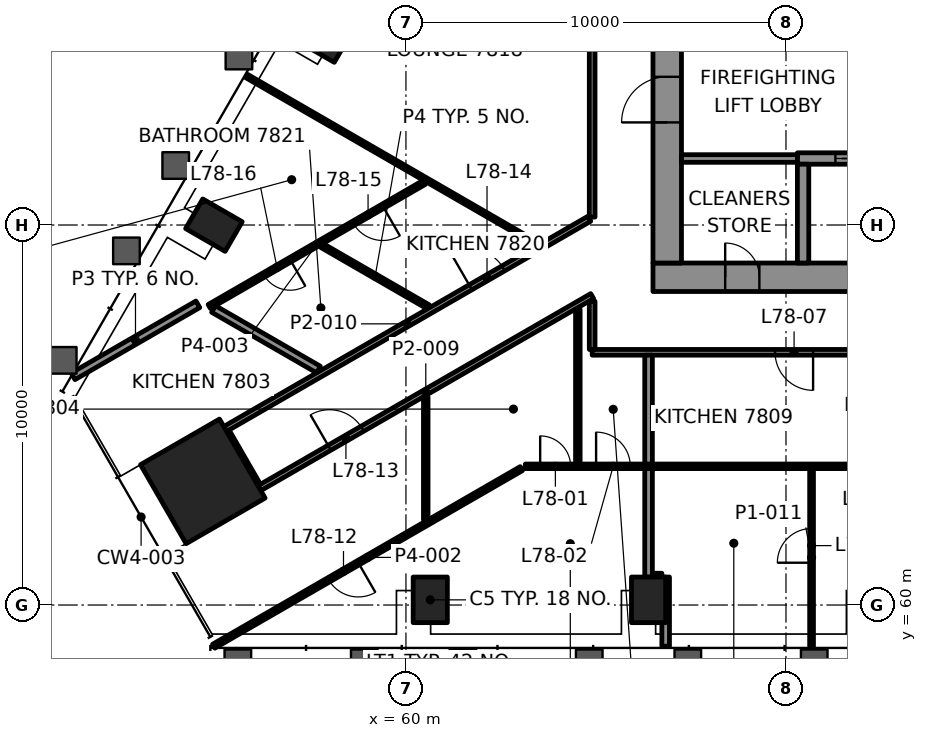
"""IFC4 building model, lengths in metres.
Left out: names, types, materials, properties, quantities, classifications, styles, units other than length and angle.
Written with IfcOpenShell. Run it as: python <this file> out.ifc"""

import sys

from ifc_helpers import new_model, si_unit, direction, frame, frame_2d, origin, origin_2d, place, context, subcontext, project, spatial, rectangle, hollow_rectangle, extrude, element, fill, save


model = new_model("IFC4")
c1 = context("Model", 3, precision=1e-05, world=origin(), true_north=direction((0.0, 1.0)))
c2 = subcontext(c1, "Body", "Model", "MODEL_VIEW")
j1 = project(units=[si_unit("LENGTHUNIT", "METRE"), si_unit("PLANEANGLEUNIT", "RADIAN")], contexts=[c1])
p1 = place(None, origin())
s1 = spatial("IfcSite", under=j1, at=p1, CompositionType="ELEMENT")
p2 = place(p1, origin())
s2 = spatial("IfcBuilding", under=s1, at=p2, CompositionType="ELEMENT")
p3 = place(p2, frame((0.0, 0.0, 319.6)))
s3 = spatial("IfcBuildingStorey", under=s2, at=p3, CompositionType="ELEMENT", Elevation=319.6)
p4 = place(p3, frame((54.655, 63.254, 0.0), z_axis=(0.0, 0.0, 1.0), x_axis=(0.5, -0.866025403784, 0.0)))
e1 = element("IfcColumn", 1, at=p4, inside=s3, PredefinedType="COLUMN", context=c2, shape_type="SweptSolid", body=[
    extrude(rectangle(XDim=2.4, YDim=2.4, at=origin_2d()), origin(), (0.0, 0.0, 1.0), 3.5),
])
for number, where, z_axis, x_axis in (
    (2, (60.64, 60.136, -0.0), (0.0, 0.0, 1.0), (1.0, 0.0, 0.0)),
    (3, (66.384, 60.136, -0.0), (0.0, 0.0, 1.0), (1.0, 0.0, 0.0)),
    (4, (57.819, 74.97, -0.0), (0.0, 0.0, 1.0), (-0.5, -0.866, 0.0)),
    (5, (54.948, 69.996, -0.0), (0.0, 0.0, 1.0), (-0.5, -0.866, 0.0)),
):
    element("IfcColumn", number, at=place(p3, frame(where, z_axis=z_axis, x_axis=x_axis)), inside=s3, PredefinedType="COLUMN", context=c2, shape_type="SweptSolid", body=[
        extrude(hollow_rectangle(XDim=0.9, YDim=1.2, WallThickness=0.06, at=origin_2d()), origin(), (0.0, 0.0, 1.0), 3.5),
    ])
p5 = place(p3, frame((66.5, 68.625, 0.0), z_axis=(0.0, 0.0, 1.0), x_axis=(1.0, 0.0, 0.0)))
e6 = element("IfcWall", 6, at=p5, inside=s3, PredefinedType="SHEAR", context=c2, shape_type="SweptSolid", body=[
    extrude(rectangle(XDim=17.0, YDim=0.75, at=frame_2d((8.5, 0.0))), origin(), (0.0, 0.0, 1.0), 3.3),
])
p6 = place(p5, frame((1.9, 0.0, 0.0)))
e7 = element("IfcOpeningElement", 7, at=p6, cuts=e6, PredefinedType="OPENING", context=c2, shape_type="SweptSolid", body=[
    extrude(rectangle(XDim=0.9, YDim=2.1, at=frame_2d((0.45, 1.05))), frame((0.0, 0.385, 0.0), z_axis=(0.0, -1.0, 0.0), x_axis=(1.0, 0.0, 0.0)), (0.0, 0.0, 1.0), 0.77),
])
p7 = place(p3, frame((66.875, 69.0, 0.0), z_axis=(0.0, 0.0, 1.0), x_axis=(0.0, 1.0, 0.0)))
e8 = element("IfcWall", 8, at=p7, inside=s3, PredefinedType="SHEAR", context=c2, shape_type="SweptSolid", body=[
    extrude(rectangle(XDim=12.0, YDim=0.75, at=frame_2d((6.0, 0.0))), origin(), (0.0, 0.0, 1.0), 3.3),
])
p8 = place(p7, frame((3.7, 0.0, 0.0)))
e9 = element("IfcOpeningElement", 9, at=p8, cuts=e8, PredefinedType="OPENING", context=c2, shape_type="SweptSolid", body=[
    extrude(rectangle(XDim=1.2, YDim=2.1, at=frame_2d((0.6, 1.05))), frame((0.0, 0.385, 0.0), z_axis=(0.0, -1.0, 0.0), x_axis=(1.0, 0.0, 0.0)), (0.0, 0.0, 1.0), 0.77),
])
p9 = place(p3, frame((70.3, 71.75, 0.0), z_axis=(0.0, 0.0, 1.0), x_axis=(1.0, 0.0, 0.0)))
e10 = element("IfcWall", 10, at=p9, inside=s3, PredefinedType="SHEAR", context=c2, shape_type="SweptSolid", body=[
    extrude(rectangle(XDim=11.5, YDim=0.3, at=frame_2d((5.75, 0.0))), origin(), (0.0, 0.0, 1.0), 3.3),
])
p10 = place(p9, frame((1.0, 0.0, 0.0)))
e11 = element("IfcOpeningElement", 11, at=p10, cuts=e10, PredefinedType="OPENING", context=c2, shape_type="SweptSolid", body=[
    extrude(rectangle(XDim=1.1, YDim=2.1, at=frame_2d((0.55, 1.05))), frame((0.0, 0.16, 0.0), z_axis=(0.0, -1.0, 0.0), x_axis=(1.0, 0.0, 0.0)), (0.0, 0.0, 1.0), 0.32),
])
p11 = place(p9, frame((3.8, 0.0, 0.0)))
e12 = element("IfcOpeningElement", 12, at=p11, cuts=e10, PredefinedType="OPENING", context=c2, shape_type="SweptSolid", body=[
    extrude(rectangle(XDim=1.1, YDim=2.1, at=frame_2d((0.55, 1.05))), frame((0.0, 0.16, 0.0), z_axis=(0.0, -1.0, 0.0), x_axis=(1.0, 0.0, 0.0)), (0.0, 0.0, 1.0), 0.32),
])
p12 = place(p9, frame((6.6, 0.0, 0.0)))
e13 = element("IfcOpeningElement", 13, at=p12, cuts=e10, PredefinedType="OPENING", context=c2, shape_type="SweptSolid", body=[
    extrude(rectangle(XDim=1.1, YDim=2.1, at=frame_2d((0.55, 1.05))), frame((0.0, 0.16, 0.0), z_axis=(0.0, -1.0, 0.0), x_axis=(1.0, 0.0, 0.0)), (0.0, 0.0, 1.0), 0.32),
])
p13 = place(p9, frame((9.4, 0.0, 0.0)))
e14 = element("IfcOpeningElement", 14, at=p13, cuts=e10, PredefinedType="OPENING", context=c2, shape_type="SweptSolid", body=[
    extrude(rectangle(XDim=1.1, YDim=2.1, at=frame_2d((0.55, 1.05))), frame((0.0, 0.16, 0.0), z_axis=(0.0, -1.0, 0.0), x_axis=(1.0, 0.0, 0.0)), (0.0, 0.0, 1.0), 0.32),
])
p14 = place(p3, frame((70.45, 69.0, 0.0), z_axis=(0.0, 0.0, 1.0), x_axis=(0.0, 1.0, 0.0)))
e15 = element("IfcWall", 15, at=p14, inside=s3, PredefinedType="SHEAR", context=c2, shape_type="SweptSolid", body=[
    extrude(rectangle(XDim=2.6, YDim=0.3, at=frame_2d((1.3, 0.0))), origin(), (0.0, 0.0, 1.0), 3.3),
])
p15 = place(p3, frame((66.484, 60.736, 0.0), z_axis=(0.0, 0.0, 1.0), x_axis=(1.0, 0.0, 0.0)))
e16 = element("IfcWall", 16, at=p15, inside=s3, PredefinedType="PARTITIONING", context=c2, shape_type="SweptSolid", body=[
    extrude(rectangle(XDim=0.25, YDim=0.2, at=frame_2d((0.125, 0.0))), origin(), (0.0, 0.0, 1.0), 2.7),
])
p16 = place(p3, frame((63.141, 63.65, 0.0), z_axis=(0.0, 0.0, 1.0), x_axis=(1.0, 0.0, 0.0)))
e17 = element("IfcWall", 17, at=p16, inside=s3, PredefinedType="PARTITIONING", context=c2, shape_type="SweptSolid", body=[
    extrude(rectangle(XDim=18.56, YDim=0.12, at=frame_2d((9.28, 0.0))), origin(), (0.0, 0.0, 1.0), 2.7),
])
p17 = place(p16, frame((0.391, 0.0, 0.0)))
e18 = element("IfcOpeningElement", 18, at=p17, cuts=e17, PredefinedType="OPENING", context=c2, shape_type="SweptSolid", body=[
    extrude(rectangle(XDim=0.8, YDim=2.1, at=frame_2d((0.4, 1.05))), frame((0.0, 0.07, 0.0), z_axis=(0.0, -1.0, 0.0), x_axis=(1.0, 0.0, 0.0)), (0.0, 0.0, 1.0), 0.14),
])
p18 = place(p16, frame((1.862, 0.0, 0.0)))
e19 = element("IfcOpeningElement", 19, at=p18, cuts=e17, PredefinedType="OPENING", context=c2, shape_type="SweptSolid", body=[
    extrude(rectangle(XDim=0.9, YDim=2.1, at=frame_2d((0.45, 1.05))), frame((0.0, 0.07, 0.0), z_axis=(0.0, -1.0, 0.0), x_axis=(1.0, 0.0, 0.0)), (0.0, 0.0, 1.0), 0.14),
])
p19 = place(p16, frame((8.768, 0.0, 0.0)))
e20 = element("IfcOpeningElement", 20, at=p19, cuts=e17, PredefinedType="OPENING", context=c2, shape_type="SweptSolid", body=[
    extrude(rectangle(XDim=0.9, YDim=2.1, at=frame_2d((0.45, 1.05))), frame((0.0, 0.07, 0.0), z_axis=(0.0, -1.0, 0.0), x_axis=(1.0, 0.0, 0.0)), (0.0, 0.0, 1.0), 0.14),
])
p20 = place(p16, frame((12.188, 0.0, 0.0)))
e21 = element("IfcOpeningElement", 21, at=p20, cuts=e17, PredefinedType="OPENING", context=c2, shape_type="SweptSolid", body=[
    extrude(rectangle(XDim=0.8, YDim=2.1, at=frame_2d((0.4, 1.05))), frame((0.0, 0.07, 0.0), z_axis=(0.0, -1.0, 0.0), x_axis=(1.0, 0.0, 0.0)), (0.0, 0.0, 1.0), 0.14),
])
p21 = place(p16, frame((16.514, 0.0, 0.0)))
e22 = element("IfcOpeningElement", 22, at=p21, cuts=e17, PredefinedType="OPENING", context=c2, shape_type="SweptSolid", body=[
    extrude(rectangle(XDim=0.9, YDim=2.1, at=frame_2d((0.45, 1.05))), frame((0.0, 0.07, 0.0), z_axis=(0.0, -1.0, 0.0), x_axis=(1.0, 0.0, 0.0)), (0.0, 0.0, 1.0), 0.14),
])
p22 = place(p3, frame((85.099, 66.65, 0.0), z_axis=(0.0, 0.0, 1.0), x_axis=(-1.0, 0.0, 0.0)))
e23 = element("IfcWall", 23, at=p22, inside=s3, PredefinedType="PARTITIONING", context=c2, shape_type="SweptSolid", body=[
    extrude(rectangle(XDim=20.199, YDim=0.15, at=frame_2d((10.1, 0.0))), origin(), (0.0, 0.0, 1.0), 2.7),
])
p23 = place(p22, frame((1.351, 0.0, 0.0)))
e24 = element("IfcOpeningElement", 24, at=p23, cuts=e23, PredefinedType="OPENING", context=c2, shape_type="SweptSolid", body=[
    extrude(rectangle(XDim=0.9, YDim=2.1, at=frame_2d((0.45, 1.05))), frame((0.0, 0.085, 0.0), z_axis=(0.0, -1.0, 0.0), x_axis=(1.0, 0.0, 0.0)), (0.0, 0.0, 1.0), 0.17),
])
p24 = place(p22, frame((14.386, 0.0, 0.0)))
e25 = element("IfcOpeningElement", 25, at=p24, cuts=e23, PredefinedType="OPENING", context=c2, shape_type="SweptSolid", body=[
    extrude(rectangle(XDim=1.0, YDim=2.1, at=frame_2d((0.5, 1.05))), frame((0.0, 0.085, 0.0), z_axis=(0.0, -1.0, 0.0), x_axis=(1.0, 0.0, 0.0)), (0.0, 0.0, 1.0), 0.17),
])
p25 = place(p3, frame((63.037, 63.59, 0.0), z_axis=(0.0, 0.0, 1.0), x_axis=(-0.866024667879, -0.500001274624, 0.0)))
e26 = element("IfcWall", 26, at=p25, inside=s3, PredefinedType="PARTITIONING", context=c2, shape_type="SweptSolid", body=[
    extrude(rectangle(XDim=9.348, YDim=0.12, at=frame_2d((4.674, 0.0))), origin(), (0.0, 0.0, 1.0), 2.7),
])
p26 = place(p25, frame((4.955, 0.0, 0.0)))
e27 = element("IfcOpeningElement", 27, at=p26, cuts=e26, PredefinedType="OPENING", context=c2, shape_type="SweptSolid", body=[
    extrude(rectangle(XDim=0.9, YDim=2.1, at=frame_2d((0.45, 1.05))), frame((0.0, 0.07, 0.0), z_axis=(0.0, -1.0, 0.0), x_axis=(1.0, 0.0, 0.0)), (0.0, 0.0, 1.0), 0.14),
])
p27 = place(p3, frame((56.145, 63.075, 0.0), z_axis=(0.0, 0.0, 1.0), x_axis=(0.866024727794, 0.500001170848, 0.0)))
e28 = element("IfcWall", 28, at=p27, inside=s3, PredefinedType="PARTITIONING", context=c2, shape_type="SweptSolid", body=[
    extrude(rectangle(XDim=10.11, YDim=0.15, at=frame_2d((5.055, 0.0))), origin(), (0.0, 0.0, 1.0), 2.697),
])
p28 = place(p27, frame((2.128, 0.0, 0.0)))
e29 = element("IfcOpeningElement", 29, at=p28, cuts=e28, PredefinedType="OPENING", context=c2, shape_type="SweptSolid", body=[
    extrude(rectangle(XDim=1.0, YDim=2.1, at=frame_2d((0.5, 1.05))), frame((0.0, 0.085, 0.0), z_axis=(0.0, -1.0, 0.0), x_axis=(1.0, 0.0, 0.0)), (0.0, 0.0, 1.0), 0.17),
])
p29 = place(p3, frame((55.244, 64.634, 0.0), z_axis=(0.0, 0.0, 1.0), x_axis=(0.866029028053, 0.499993722531, 0.0)))
e30 = element("IfcWall", 30, at=p29, inside=s3, PredefinedType="PARTITIONING", context=c2, shape_type="SweptSolid", body=[
    extrude(rectangle(XDim=11.063, YDim=0.15, at=frame_2d((5.531, 0.0))), origin(), (0.0, 0.0, 1.0), 2.7),
])
p30 = place(p29, frame((7.454, 0.0, 0.0)))
e31 = element("IfcOpeningElement", 31, at=p30, cuts=e30, PredefinedType="OPENING", context=c2, shape_type="SweptSolid", body=[
    extrude(rectangle(XDim=1.0, YDim=2.1, at=frame_2d((0.5, 1.05))), frame((0.0, 0.085, 0.0), z_axis=(0.0, -1.0, 0.0), x_axis=(1.0, 0.0, 0.0)), (0.0, 0.0, 1.0), 0.17),
])
p31 = place(p3, frame((60.485, 71.123, 0.0), z_axis=(0.0, 0.0, 1.0), x_axis=(-0.866018230694, -0.500012423951, 0.0)))
e32 = element("IfcWall", 32, at=p31, inside=s3, PredefinedType="PARTITIONING", context=c2, shape_type="SweptSolid", body=[
    extrude(rectangle(XDim=6.535, YDim=0.12, at=frame_2d((3.268, 0.0))), origin(), (0.0, 0.0, 1.0), 2.7),
])
p32 = place(p31, frame((1.261, 0.0, 0.0)))
e33 = element("IfcOpeningElement", 33, at=p32, cuts=e32, PredefinedType="OPENING", context=c2, shape_type="SweptSolid", body=[
    extrude(rectangle(XDim=0.9, YDim=2.1, at=frame_2d((0.45, 1.05))), frame((0.0, 0.07, 0.0), z_axis=(0.0, -1.0, 0.0), x_axis=(1.0, 0.0, 0.0)), (0.0, 0.0, 1.0), 0.14),
])
p33 = place(p31, frame((4.077, 0.0, 0.0)))
e34 = element("IfcOpeningElement", 34, at=p33, cuts=e32, PredefinedType="OPENING", context=c2, shape_type="SweptSolid", body=[
    extrude(rectangle(XDim=0.8, YDim=2.1, at=frame_2d((0.4, 1.05))), frame((0.0, 0.07, 0.0), z_axis=(0.0, -1.0, 0.0), x_axis=(1.0, 0.0, 0.0)), (0.0, 0.0, 1.0), 0.14),
])
p34 = place(p3, frame((51.242, 66.018, 0.0), z_axis=(0.0, 0.0, 1.0), x_axis=(0.866010743078, 0.500025392229, 0.0)))
e35 = element("IfcWall", 35, at=p34, inside=s3, PredefinedType="PARTITIONING", context=c2, shape_type="SweptSolid", body=[
    extrude(rectangle(XDim=3.79, YDim=0.2, at=frame_2d((1.895, 0.0))), origin(), (0.0, 0.0, 1.0), 2.7),
])
p35 = place(p3, frame((70.673, 58.916, 0.0), z_axis=(0.0, 0.0, 1.0), x_axis=(0.0, 1.0, 0.0)))
e36 = element("IfcWall", 36, at=p35, inside=s3, PredefinedType="PARTITIONING", context=c2, shape_type="SweptSolid", body=[
    extrude(rectangle(XDim=4.674, YDim=0.1, at=frame_2d((2.337, 0.0))), origin(), (0.0, 0.0, 1.0), 2.688),
])
p36 = place(p35, frame((2.197, 0.0, 0.0)))
e37 = element("IfcOpeningElement", 37, at=p36, cuts=e36, PredefinedType="OPENING", context=c2, shape_type="SweptSolid", body=[
    extrude(rectangle(XDim=0.9, YDim=2.1, at=frame_2d((0.45, 1.05))), frame((0.0, 0.06, 0.0), z_axis=(0.0, -1.0, 0.0), x_axis=(1.0, 0.0, 0.0)), (0.0, 0.0, 1.0), 0.12),
])
p37 = place(p3, frame((66.834, 58.916, 0.0), z_axis=(0.0, 0.0, 1.0), x_axis=(0.0, 1.0, 0.0)))
e38 = element("IfcWall", 38, at=p37, inside=s3, PredefinedType="PARTITIONING", context=c2, shape_type="SweptSolid", body=[
    extrude(rectangle(XDim=1.82, YDim=0.2, at=frame_2d((0.91, 0.0))), origin(), (0.0, 0.0, 1.0), 2.688),
])
p38 = place(p3, frame((66.384, 60.736, 0.0), z_axis=(0.0, 0.0, 1.0), x_axis=(0.0, 1.0, 0.0)))
e39 = element("IfcWall", 39, at=p38, inside=s3, PredefinedType="PARTITIONING", context=c2, shape_type="SweptSolid", body=[
    extrude(rectangle(XDim=2.854, YDim=0.2, at=frame_2d((1.427, 0.0))), origin(), (0.0, 0.0, 1.0), 2.7),
])
p39 = place(p3, frame((64.9, 66.725, 0.0), z_axis=(0.0, 0.0, 1.0), x_axis=(0.0, 1.0, 0.0)))
e40 = element("IfcWall", 40, at=p39, inside=s3, PredefinedType="PARTITIONING", context=c2, shape_type="SweptSolid", body=[
    extrude(rectangle(XDim=1.268, YDim=0.15, at=frame_2d((0.634, 0.0))), origin(), (0.0, 0.0, 1.0), 2.697),
])
p40 = place(p3, frame((64.9, 70.208, 0.0), z_axis=(0.0, 0.0, 1.0), x_axis=(0.0, 1.0, 0.0)))
e41 = element("IfcWall", 41, at=p40, inside=s3, PredefinedType="PARTITIONING", context=c2, shape_type="SweptSolid", body=[
    extrude(rectangle(XDim=13.141, YDim=0.15, at=frame_2d((6.571, 0.0))), origin(), (0.0, 0.0, 1.0), 2.7),
])
p41 = place(p3, frame((64.523, 63.71, 0.0), z_axis=(0.0, 0.0, 1.0), x_axis=(0.0, 1.0, 0.0)))
e42 = element("IfcWall", 42, at=p41, inside=s3, PredefinedType="PARTITIONING", context=c2, shape_type="SweptSolid", body=[
    extrude(rectangle(XDim=4.075, YDim=0.12, at=frame_2d((2.038, 0.0))), origin(), (0.0, 0.0, 1.0), 2.697),
])
p42 = place(p3, frame((60.521, 62.247, 0.0), z_axis=(0.0, 0.0, 1.0), x_axis=(0.0, 1.0, 0.0)))
e43 = element("IfcWall", 43, at=p42, inside=s3, PredefinedType="PARTITIONING", context=c2, shape_type="SweptSolid", body=[
    extrude(rectangle(XDim=3.228, YDim=0.12, at=frame_2d((1.614, 0.0))), origin(), (0.0, 0.0, 1.0), 2.7),
])
p43 = place(p3, frame((56.106, 63.139, 0.0), z_axis=(0.0, 0.0, 1.0), x_axis=(-0.499944585209, 0.866057395165, 0.0)))
e44 = element("IfcWall", 44, at=p43, inside=s3, PredefinedType="PARTITIONING", context=c2, shape_type="SweptSolid", body=[
    extrude(rectangle(XDim=1.649, YDim=0.15, at=frame_2d((0.825, 0.0))), origin(), (0.0, 0.0, 1.0), 2.697),
])
p44 = place(p3, frame((63.468, 69.498, 0.0), z_axis=(0.0, 0.0, 1.0), x_axis=(-0.866028903224, 0.499993938743, 0.0)))
e45 = element("IfcWall", 45, at=p44, inside=s3, PredefinedType="PARTITIONING", context=c2, shape_type="SweptSolid", body=[
    extrude(rectangle(XDim=8.848, YDim=0.1, at=frame_2d((4.424, 0.0))), origin(), (0.0, 0.0, 1.0), 2.7),
])
p45 = place(p3, frame((60.588, 67.845, 0.0), z_axis=(0.0, 0.0, 1.0), x_axis=(-0.86605210011, 0.499953757757, 0.0)))
e46 = element("IfcWall", 46, at=p45, inside=s3, PredefinedType="PARTITIONING", context=c2, shape_type="SweptSolid", body=[
    extrude(rectangle(XDim=3.228, YDim=0.12, at=frame_2d((1.614, 0.0))), origin(), (0.0, 0.0, 1.0), 2.7),
])
p46 = place(p3, frame((57.698, 66.197, 0.0), z_axis=(0.0, 0.0, 1.0), x_axis=(-0.866019818373, 0.500009674092, 0.0)))
e47 = element("IfcWall", 47, at=p46, inside=s3, PredefinedType="PARTITIONING", context=c2, shape_type="SweptSolid", body=[
    extrude(rectangle(XDim=3.188, YDim=0.2, at=frame_2d((1.594, 0.0))), origin(), (0.0, 0.0, 1.0), 2.7),
])
p47 = place(p3, frame((66.384, 63.71, 0.0), z_axis=(0.0, 0.0, 1.0), x_axis=(0.0, 1.0, 0.0)))
e48 = element("IfcWall", 48, at=p47, inside=s3, PredefinedType="PARTITIONING", context=c2, shape_type="SweptSolid", body=[
    extrude(rectangle(XDim=2.865, YDim=0.2, at=frame_2d((1.433, 0.0))), origin(), (0.0, 0.0, 1.0), 2.7),
])
p48 = place(p3, frame((67.25, 71.75, 0.0), z_axis=(0.0, 0.0, 1.0), x_axis=(1.0, 0.0, 0.0)))
e49 = element("IfcWall", 49, at=p48, inside=s3, PredefinedType="PARTITIONING", context=c2, shape_type="SweptSolid", body=[
    extrude(rectangle(XDim=3.05, YDim=0.2, at=frame_2d((1.525, 0.0))), origin(), (0.0, 0.0, 1.0), 3.3),
])
p49 = place(p17, origin())
e50 = element("IfcDoor", 50, at=p49, inside=s3, OperationType="SINGLE_SWING_RIGHT", PredefinedType="DOOR", context=c2, shape_type="SweptSolid", body=[
    extrude(rectangle(XDim=0.8, YDim=2.1, at=frame_2d((0.4, 1.05))), frame((0.0, 0.025, 0.0), z_axis=(0.0, -1.0, 0.0), x_axis=(1.0, 0.0, 0.0)), (0.0, 0.0, 1.0), 0.05),
])
fill(e18, e50)
p50 = place(p18, origin())
e51 = element("IfcDoor", 51, at=p50, inside=s3, OperationType="SINGLE_SWING_LEFT", PredefinedType="DOOR", context=c2, shape_type="SweptSolid", body=[
    extrude(rectangle(XDim=0.9, YDim=2.1, at=frame_2d((0.45, 1.05))), frame((0.0, 0.025, 0.0), z_axis=(0.0, -1.0, 0.0), x_axis=(1.0, 0.0, 0.0)), (0.0, 0.0, 1.0), 0.05),
])
fill(e19, e51)
p51 = place(p24, origin())
e52 = element("IfcDoor", 52, at=p51, inside=s3, OperationType="SINGLE_SWING_RIGHT", PredefinedType="DOOR", context=c2, shape_type="SweptSolid", body=[
    extrude(rectangle(XDim=1.0, YDim=2.1, at=frame_2d((0.5, 1.05))), frame((0.0, 0.025, 0.0), z_axis=(0.0, -1.0, 0.0), x_axis=(1.0, 0.0, 0.0)), (0.0, 0.0, 1.0), 0.05),
])
fill(e25, e52)
p52 = place(p26, origin())
e53 = element("IfcDoor", 53, at=p52, inside=s3, OperationType="SINGLE_SWING_LEFT", PredefinedType="DOOR", context=c2, shape_type="SweptSolid", body=[
    extrude(rectangle(XDim=0.9, YDim=2.1, at=frame_2d((0.45, 1.05))), frame((0.0, 0.025, 0.0), z_axis=(0.0, -1.0, 0.0), x_axis=(1.0, 0.0, 0.0)), (0.0, 0.0, 1.0), 0.05),
])
fill(e27, e53)
p53 = place(p28, origin())
e54 = element("IfcDoor", 54, at=p53, inside=s3, OperationType="SINGLE_SWING_LEFT", PredefinedType="DOOR", context=c2, shape_type="SweptSolid", body=[
    extrude(rectangle(XDim=1.0, YDim=2.1, at=frame_2d((0.5, 1.05))), frame((0.0, 0.025, 0.0), z_axis=(0.0, -1.0, 0.0), x_axis=(1.0, 0.0, 0.0)), (0.0, 0.0, 1.0), 0.05),
])
fill(e29, e54)
p54 = place(p30, origin())
e55 = element("IfcDoor", 55, at=p54, inside=s3, OperationType="SINGLE_SWING_LEFT", PredefinedType="DOOR", context=c2, shape_type="SweptSolid", body=[
    extrude(rectangle(XDim=1.0, YDim=2.1, at=frame_2d((0.5, 1.05))), frame((0.0, 0.025, 0.0), z_axis=(0.0, -1.0, 0.0), x_axis=(1.0, 0.0, 0.0)), (0.0, 0.0, 1.0), 0.05),
])
fill(e31, e55)
p55 = place(p32, origin())
e56 = element("IfcDoor", 56, at=p55, inside=s3, OperationType="SINGLE_SWING_LEFT", PredefinedType="DOOR", context=c2, shape_type="SweptSolid", body=[
    extrude(rectangle(XDim=0.9, YDim=2.1, at=frame_2d((0.45, 1.05))), frame((0.0, 0.025, 0.0), z_axis=(0.0, -1.0, 0.0), x_axis=(1.0, 0.0, 0.0)), (0.0, 0.0, 1.0), 0.05),
])
fill(e33, e56)
p56 = place(p33, origin())
e57 = element("IfcDoor", 57, at=p56, inside=s3, OperationType="SINGLE_SWING_LEFT", PredefinedType="DOOR", context=c2, shape_type="SweptSolid", body=[
    extrude(rectangle(XDim=0.8, YDim=2.1, at=frame_2d((0.4, 1.05))), frame((0.0, 0.025, 0.0), z_axis=(0.0, -1.0, 0.0), x_axis=(1.0, 0.0, 0.0)), (0.0, 0.0, 1.0), 0.05),
])
fill(e34, e57)
p57 = place(p36, origin())
e58 = element("IfcDoor", 58, at=p57, inside=s3, OperationType="SINGLE_SWING_LEFT", PredefinedType="DOOR", context=c2, shape_type="SweptSolid", body=[
    extrude(rectangle(XDim=0.9, YDim=2.1, at=frame_2d((0.45, 1.05))), frame((0.0, 0.025, 0.0), z_axis=(0.0, -1.0, 0.0), x_axis=(1.0, 0.0, 0.0)), (0.0, 0.0, 1.0), 0.05),
])
fill(e37, e58)
p58 = place(p10, origin())
e59 = element("IfcDoor", 59, at=p58, inside=s3, OperationType="DOUBLE_DOOR_SLIDING", PredefinedType="DOOR", context=c2, shape_type="SweptSolid", body=[
    extrude(rectangle(XDim=1.1, YDim=2.1, at=frame_2d((0.55, 1.05))), frame((0.0, 0.025, 0.0), z_axis=(0.0, -1.0, 0.0), x_axis=(1.0, 0.0, 0.0)), (0.0, 0.0, 1.0), 0.05),
])
fill(e11, e59)
p59 = place(p8, origin())
e60 = element("IfcDoor", 60, at=p59, inside=s3, OperationType="SINGLE_SWING_RIGHT", PredefinedType="DOOR", context=c2, shape_type="SweptSolid", body=[
    extrude(rectangle(XDim=1.2, YDim=2.1, at=frame_2d((0.6, 1.05))), frame((0.0, 0.095, 0.0), z_axis=(0.0, -1.0, 0.0), x_axis=(1.0, 0.0, 0.0)), (0.0, 0.0, 1.0), 0.19),
])
fill(e9, e60)
p60 = place(p6, origin())
e61 = element("IfcDoor", 61, at=p60, inside=s3, OperationType="SINGLE_SWING_RIGHT", PredefinedType="DOOR", context=c2, shape_type="SweptSolid", body=[
    extrude(rectangle(XDim=0.9, YDim=2.1, at=frame_2d((0.45, 1.05))), frame((0.0, 0.095, 0.0), z_axis=(0.0, -1.0, 0.0), x_axis=(1.0, 0.0, 0.0)), (0.0, 0.0, 1.0), 0.19),
])
fill(e7, e61)
save(model, sys.argv[1])
